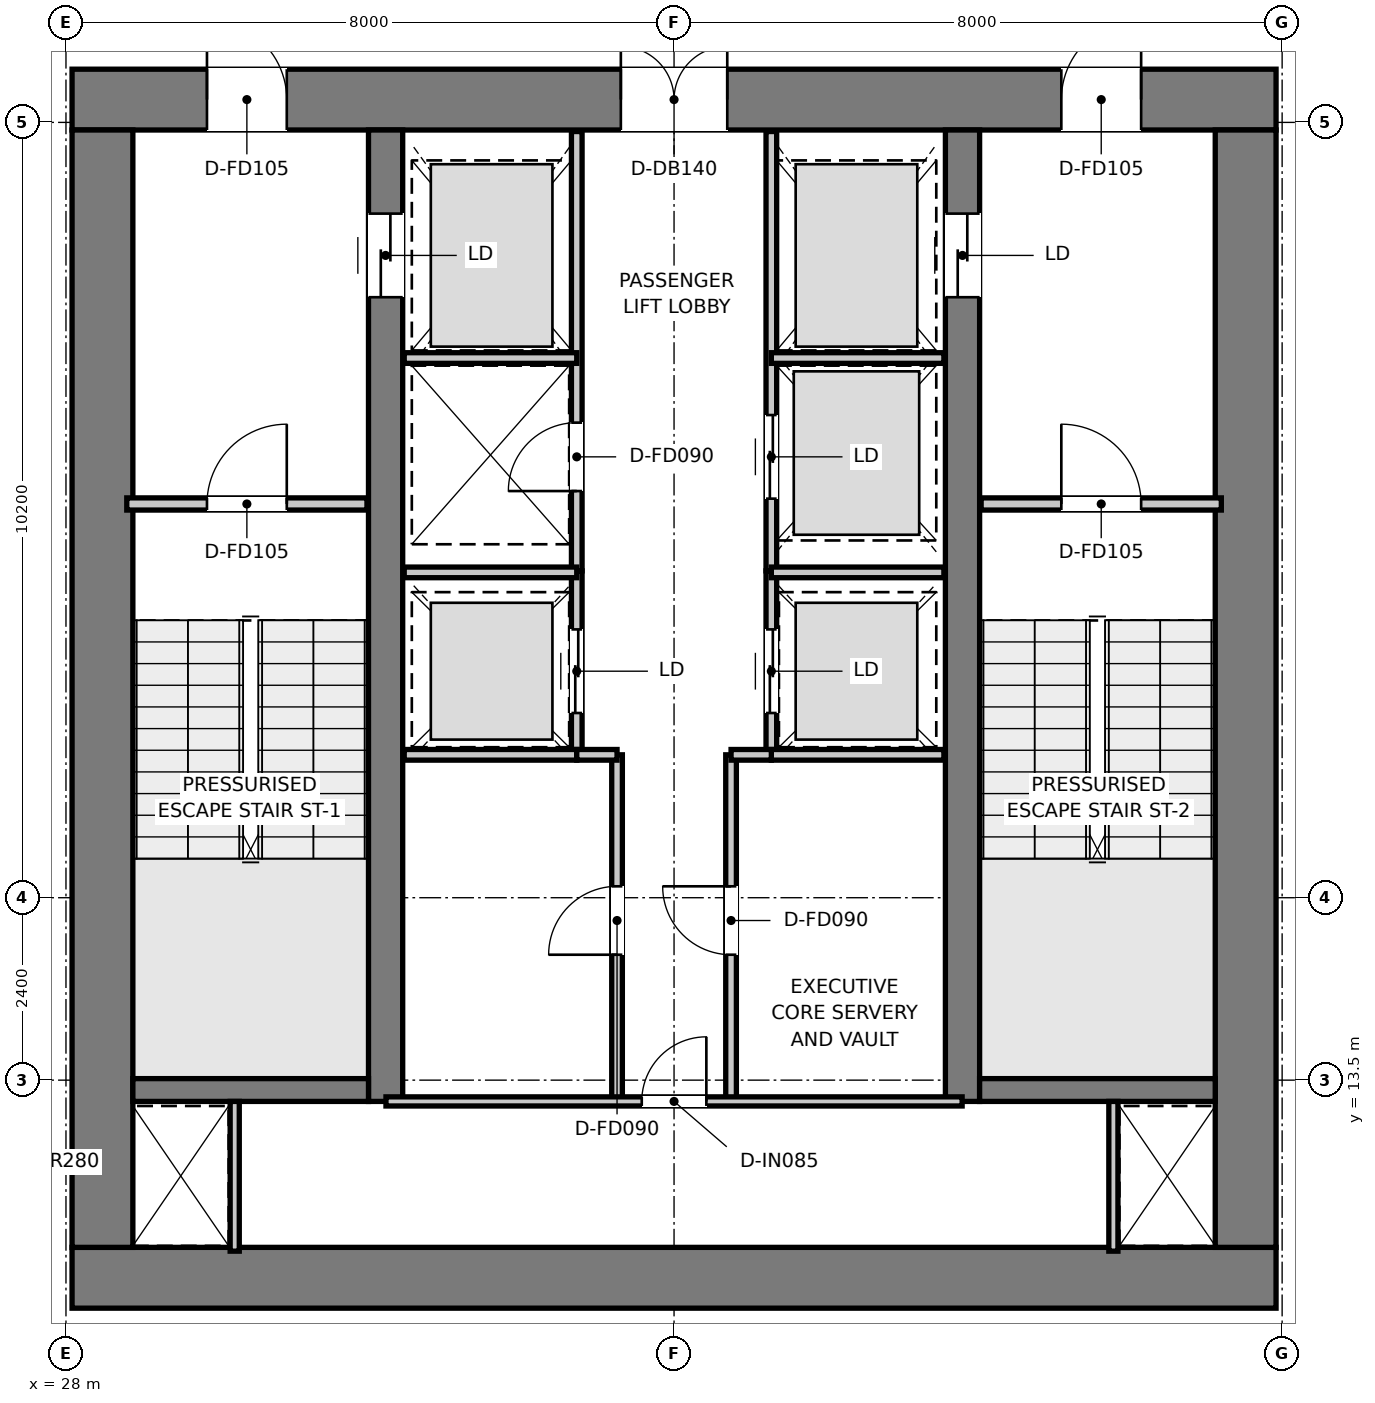
"""IFC4 building model, lengths in metres.
Left out: names, types, materials, properties, quantities, classifications, styles, units other than length and angle.
Written with IfcOpenShell. Run it as: python <this file> out.ifc"""

import sys

from ifc_helpers import new_model, si_unit, direction, frame, frame_2d, origin, place, context, subcontext, project, spatial, rectangle, extrude, element, fill, save


model = new_model("IFC4")
c1 = context("Model", 3, precision=1e-05, world=origin(), true_north=direction((0.0, 1.0)))
c2 = subcontext(c1, "Body", "Model", "MODEL_VIEW")
j1 = project(units=[si_unit("LENGTHUNIT", "METRE"), si_unit("PLANEANGLEUNIT", "RADIAN")], contexts=[c1])
p1 = place(None, origin())
s1 = spatial("IfcSite", under=j1, at=p1, CompositionType="ELEMENT")
p2 = place(p1, origin())
s2 = spatial("IfcBuilding", under=s1, at=p2, CompositionType="ELEMENT")
p3 = place(p2, frame((0.0, 0.0, 310.85)))
s3 = spatial("IfcBuildingStorey", under=s2, at=p3, CompositionType="ELEMENT", Elevation=310.85)
p4 = place(p3, frame((28.08, 10.9, 0.0), z_axis=(0.0, 0.0, 1.0), x_axis=(1.0, 0.0, 0.0)))
e1 = element("IfcWall", 1, at=p4, inside=s3, PredefinedType="SHEAR", context=c2, shape_type="SweptSolid", body=[
    extrude(rectangle(XDim=15.84, YDim=0.8, at=frame_2d((7.92, 0.0))), origin(), (0.0, 0.0, 1.0), 3.95),
])
p5 = place(p3, frame((28.08, 26.4, 0.0), z_axis=(0.0, 0.0, 1.0), x_axis=(1.0, 0.0, 0.0)))
e2 = element("IfcWall", 2, at=p5, inside=s3, PredefinedType="SHEAR", context=c2, shape_type="SweptSolid", body=[
    extrude(rectangle(XDim=15.84, YDim=0.8, at=frame_2d((7.92, 0.0))), origin(), (0.0, 0.0, 1.0), 3.95),
])
p6 = place(p5, frame((7.22, 0.0, 0.0)))
e3 = element("IfcOpeningElement", 3, at=p6, cuts=e2, PredefinedType="OPENING", context=c2, shape_type="SweptSolid", body=[
    extrude(rectangle(XDim=1.4, YDim=2.2, at=frame_2d((0.7, 1.1))), frame((0.0, 0.41, 0.0), z_axis=(0.0, -1.0, 0.0), x_axis=(1.0, 0.0, 0.0)), (0.0, 0.0, 1.0), 0.82),
])
p7 = place(p5, frame((1.775, 0.0, 0.0)))
e4 = element("IfcOpeningElement", 4, at=p7, cuts=e2, PredefinedType="OPENING", context=c2, shape_type="SweptSolid", body=[
    extrude(rectangle(XDim=1.05, YDim=2.1, at=frame_2d((0.525, 1.05))), frame((0.0, 0.41, 0.0), z_axis=(0.0, -1.0, 0.0), x_axis=(1.0, 0.0, 0.0)), (0.0, 0.0, 1.0), 0.82),
])
p8 = place(p5, frame((13.015, 0.0, 0.0)))
e5 = element("IfcOpeningElement", 5, at=p8, cuts=e2, PredefinedType="OPENING", context=c2, shape_type="SweptSolid", body=[
    extrude(rectangle(XDim=1.05, YDim=2.1, at=frame_2d((0.525, 1.05))), frame((0.0, 0.41, 0.0), z_axis=(0.0, -1.0, 0.0), x_axis=(1.0, 0.0, 0.0)), (0.0, 0.0, 1.0), 0.82),
])
for number, where, z_axis, x_axis in (
    (6, (28.48, 11.3, 0.0), (0.0, 0.0, 1.0), (0.0, 1.0, 0.0)),
    (7, (43.52, 11.3, 0.0), (0.0, 0.0, 1.0), (0.0, 1.0, 0.0)),
):
    element("IfcWall", number, at=place(p3, frame(where, z_axis=z_axis, x_axis=x_axis)), inside=s3, PredefinedType="SHEAR", context=c2, shape_type="SweptSolid", body=[
        extrude(rectangle(XDim=14.7, YDim=0.8, at=frame_2d((7.35, 0.0))), origin(), (0.0, 0.0, 1.0), 3.95),
    ])
p9 = place(p3, frame((32.205, 13.22, 0.0), z_axis=(0.0, 0.0, 1.0), x_axis=(0.0, 1.0, 0.0)))
e8 = element("IfcWall", 8, at=p9, inside=s3, PredefinedType="SHEAR", context=c2, shape_type="SweptSolid", body=[
    extrude(rectangle(XDim=12.78, YDim=0.45, at=frame_2d((6.39, 0.0))), origin(), (0.0, 0.0, 1.0), 3.95),
])
p10 = place(p9, frame((10.58, 0.0, 0.0)))
e9 = element("IfcOpeningElement", 9, at=p10, cuts=e8, PredefinedType="OPENING", context=c2, shape_type="SweptSolid", body=[
    extrude(rectangle(XDim=1.1, YDim=2.15, at=frame_2d((0.55, 1.075))), frame((0.0, 0.235, 0.0), z_axis=(0.0, -1.0, 0.0), x_axis=(1.0, 0.0, 0.0)), (0.0, 0.0, 1.0), 0.47),
])
p11 = place(p3, frame((39.795, 13.22, 0.0), z_axis=(0.0, 0.0, 1.0), x_axis=(0.0, 1.0, 0.0)))
e10 = element("IfcWall", 10, at=p11, inside=s3, PredefinedType="SHEAR", context=c2, shape_type="SweptSolid", body=[
    extrude(rectangle(XDim=12.78, YDim=0.45, at=frame_2d((6.39, 0.0))), origin(), (0.0, 0.0, 1.0), 3.95),
])
p12 = place(p11, frame((10.58, 0.0, 0.0)))
e11 = element("IfcOpeningElement", 11, at=p12, cuts=e10, PredefinedType="OPENING", context=c2, shape_type="SweptSolid", body=[
    extrude(rectangle(XDim=1.1, YDim=2.15, at=frame_2d((0.55, 1.075))), frame((0.0, 0.235, 0.0), z_axis=(0.0, -1.0, 0.0), x_axis=(1.0, 0.0, 0.0)), (0.0, 0.0, 1.0), 0.47),
])
for number, where, z_axis, x_axis in (
    (12, (28.88, 13.37, 0.0), (0.0, 0.0, 1.0), (1.0, 0.0, 0.0)),
    (13, (40.02, 13.37, 0.0), (0.0, 0.0, 1.0), (1.0, 0.0, 0.0)),
):
    element("IfcWall", number, at=place(p3, frame(where, z_axis=z_axis, x_axis=x_axis)), inside=s3, PredefinedType="SHEAR", context=c2, shape_type="SweptSolid", body=[
        extrude(rectangle(XDim=3.1, YDim=0.3, at=frame_2d((1.55, 0.0))), origin(), (0.0, 0.0, 1.0), 3.95),
    ])
p13 = place(p3, frame((28.8, 21.08, 0.0), z_axis=(0.0, 0.0, 1.0), x_axis=(1.0, 0.0, 0.0)))
e14 = element("IfcWall", 14, at=p13, inside=s3, PredefinedType="PARTITIONING", context=c2, shape_type="SweptSolid", body=[
    extrude(rectangle(XDim=3.16, YDim=0.16, at=frame_2d((1.58, 0.0))), origin(), (0.0, 0.0, 1.0), 3.67),
])
p14 = place(p13, frame((1.055, 0.0, 0.0)))
e15 = element("IfcOpeningElement", 15, at=p14, cuts=e14, PredefinedType="OPENING", context=c2, shape_type="SweptSolid", body=[
    extrude(rectangle(XDim=1.05, YDim=2.1, at=frame_2d((0.525, 1.05))), frame((0.0, 0.09, 0.0), z_axis=(0.0, -1.0, 0.0), x_axis=(1.0, 0.0, 0.0)), (0.0, 0.0, 1.0), 0.18),
])
p15 = place(p3, frame((40.04, 21.08, 0.0), z_axis=(0.0, 0.0, 1.0), x_axis=(1.0, 0.0, 0.0)))
e16 = element("IfcWall", 16, at=p15, inside=s3, PredefinedType="PARTITIONING", context=c2, shape_type="SweptSolid", body=[
    extrude(rectangle(XDim=3.16, YDim=0.16, at=frame_2d((1.58, 0.0))), origin(), (0.0, 0.0, 1.0), 3.67),
])
p16 = place(p15, frame((1.055, 0.0, 0.0)))
e17 = element("IfcOpeningElement", 17, at=p16, cuts=e16, PredefinedType="OPENING", context=c2, shape_type="SweptSolid", body=[
    extrude(rectangle(XDim=1.05, YDim=2.1, at=frame_2d((0.525, 1.05))), frame((0.0, 0.09, 0.0), z_axis=(0.0, -1.0, 0.0), x_axis=(1.0, 0.0, 0.0)), (0.0, 0.0, 1.0), 0.18),
])
p17 = place(p3, frame((34.72, 20.2, 0.0), z_axis=(0.0, 0.0, 1.0), x_axis=(0.0, 1.0, 0.0)))
e18 = element("IfcWall", 18, at=p17, inside=s3, PredefinedType="PARTITIONING", context=c2, shape_type="SweptSolid", body=[
    extrude(rectangle(XDim=5.78, YDim=0.14, at=frame_2d((2.89, 0.0))), origin(), (0.0, 0.0, 1.0), 2.82),
])
p18 = place(p17, frame((1.05, 0.0, 0.0)))
e19 = element("IfcOpeningElement", 19, at=p18, cuts=e18, PredefinedType="OPENING", context=c2, shape_type="SweptSolid", body=[
    extrude(rectangle(XDim=0.9, YDim=2.1, at=frame_2d((0.45, 1.05))), frame((0.0, 0.08, 0.0), z_axis=(0.0, -1.0, 0.0), x_axis=(1.0, 0.0, 0.0)), (0.0, 0.0, 1.0), 0.16),
])
p19 = place(p3, frame((37.28, 20.2, 0.0), z_axis=(0.0, 0.0, 1.0), x_axis=(0.0, 1.0, 0.0)))
e20 = element("IfcWall", 20, at=p19, inside=s3, PredefinedType="PARTITIONING", context=c2, shape_type="SweptSolid", body=[
    extrude(rectangle(XDim=5.78, YDim=0.14, at=frame_2d((2.89, 0.0))), origin(), (0.0, 0.0, 1.0), 2.82),
])
p20 = place(p19, frame((0.95, 0.0, 0.0)))
e21 = element("IfcOpeningElement", 21, at=p20, cuts=e20, PredefinedType="OPENING", context=c2, shape_type="SweptSolid", body=[
    extrude(rectangle(XDim=1.1, YDim=2.15, at=frame_2d((0.55, 1.075))), frame((0.0, 0.08, 0.0), z_axis=(0.0, -1.0, 0.0), x_axis=(1.0, 0.0, 0.0)), (0.0, 0.0, 1.0), 0.16),
])
for number, where, z_axis, x_axis in (
    (22, (32.45, 23.0, 0.0), (0.0, 0.0, 1.0), (1.0, 0.0, 0.0)),
    (23, (37.28, 23.0, 0.0), (0.0, 0.0, 1.0), (1.0, 0.0, 0.0)),
):
    element("IfcWall", number, at=place(p3, frame(where, z_axis=z_axis, x_axis=x_axis)), inside=s3, PredefinedType="PARTITIONING", context=c2, shape_type="SweptSolid", body=[
        extrude(rectangle(XDim=2.27, YDim=0.14, at=frame_2d((1.135, 0.0))), origin(), (0.0, 0.0, 1.0), 2.82),
    ])
p21 = place(p3, frame((34.72, 17.78, 0.0), z_axis=(0.0, 0.0, 1.0), x_axis=(0.0, 1.0, 0.0)))
e24 = element("IfcWall", 24, at=p21, inside=s3, PredefinedType="PARTITIONING", context=c2, shape_type="SweptSolid", body=[
    extrude(rectangle(XDim=2.42, YDim=0.14, at=frame_2d((1.21, 0.0))), origin(), (0.0, 0.0, 1.0), 3.67),
])
p22 = place(p21, frame((0.55, 0.0, 0.0)))
e25 = element("IfcOpeningElement", 25, at=p22, cuts=e24, PredefinedType="OPENING", context=c2, shape_type="SweptSolid", body=[
    extrude(rectangle(XDim=1.1, YDim=2.15, at=frame_2d((0.55, 1.075))), frame((0.0, 0.08, 0.0), z_axis=(0.0, -1.0, 0.0), x_axis=(1.0, 0.0, 0.0)), (0.0, 0.0, 1.0), 0.16),
])
p23 = place(p3, frame((37.28, 17.78, 0.0), z_axis=(0.0, 0.0, 1.0), x_axis=(0.0, 1.0, 0.0)))
e26 = element("IfcWall", 26, at=p23, inside=s3, PredefinedType="PARTITIONING", context=c2, shape_type="SweptSolid", body=[
    extrude(rectangle(XDim=2.42, YDim=0.14, at=frame_2d((1.21, 0.0))), origin(), (0.0, 0.0, 1.0), 3.67),
])
p24 = place(p23, frame((0.55, 0.0, 0.0)))
e27 = element("IfcOpeningElement", 27, at=p24, cuts=e26, PredefinedType="OPENING", context=c2, shape_type="SweptSolid", body=[
    extrude(rectangle(XDim=1.1, YDim=2.15, at=frame_2d((0.55, 1.075))), frame((0.0, 0.08, 0.0), z_axis=(0.0, -1.0, 0.0), x_axis=(1.0, 0.0, 0.0)), (0.0, 0.0, 1.0), 0.16),
])
for number, where, z_axis, x_axis in (
    (28, (32.45, 17.78, 0.0), (0.0, 0.0, 1.0), (1.0, 0.0, 0.0)),
    (29, (32.45, 20.18, 0.0), (0.0, 0.0, 1.0), (1.0, 0.0, 0.0)),
    (30, (37.28, 17.78, 0.0), (0.0, 0.0, 1.0), (1.0, 0.0, 0.0)),
    (31, (37.28, 20.18, 0.0), (0.0, 0.0, 1.0), (1.0, 0.0, 0.0)),
):
    element("IfcWall", number, at=place(p3, frame(where, z_axis=z_axis, x_axis=x_axis)), inside=s3, PredefinedType="PARTITIONING", context=c2, shape_type="SweptSolid", body=[
        extrude(rectangle(XDim=2.27, YDim=0.14, at=frame_2d((1.135, 0.0))), origin(), (0.0, 0.0, 1.0), 3.67),
    ])
p25 = place(p3, frame((35.25, 13.22, 0.0), z_axis=(0.0, 0.0, 1.0), x_axis=(0.0, 1.0, 0.0)))
e32 = element("IfcWall", 32, at=p25, inside=s3, PredefinedType="PARTITIONING", context=c2, shape_type="SweptSolid", body=[
    extrude(rectangle(XDim=4.56, YDim=0.14, at=frame_2d((2.28, 0.0))), origin(), (0.0, 0.0, 1.0), 3.67),
])
p26 = place(p25, frame((1.93, 0.0, 0.0)))
e33 = element("IfcOpeningElement", 33, at=p26, cuts=e32, PredefinedType="OPENING", context=c2, shape_type="SweptSolid", body=[
    extrude(rectangle(XDim=0.9, YDim=2.1, at=frame_2d((0.45, 1.05))), frame((0.0, 0.08, 0.0), z_axis=(0.0, -1.0, 0.0), x_axis=(1.0, 0.0, 0.0)), (0.0, 0.0, 1.0), 0.16),
])
p27 = place(p3, frame((34.72, 17.78, 0.0), z_axis=(0.0, 0.0, 1.0), x_axis=(1.0, 0.0, 0.0)))
e34 = element("IfcWall", 34, at=p27, inside=s3, PredefinedType="PARTITIONING", context=c2, shape_type="SweptSolid", body=[
    extrude(rectangle(XDim=0.53, YDim=0.14, at=frame_2d((0.265, 0.0))), origin(), (0.0, 0.0, 1.0), 3.67),
])
p28 = place(p3, frame((36.75, 13.22, 0.0), z_axis=(0.0, 0.0, 1.0), x_axis=(0.0, 1.0, 0.0)))
e35 = element("IfcWall", 35, at=p28, inside=s3, PredefinedType="PARTITIONING", context=c2, shape_type="SweptSolid", body=[
    extrude(rectangle(XDim=4.56, YDim=0.14, at=frame_2d((2.28, 0.0))), origin(), (0.0, 0.0, 1.0), 3.67),
])
p29 = place(p28, frame((1.93, 0.0, 0.0)))
e36 = element("IfcOpeningElement", 36, at=p29, cuts=e35, PredefinedType="OPENING", context=c2, shape_type="SweptSolid", body=[
    extrude(rectangle(XDim=0.9, YDim=2.1, at=frame_2d((0.45, 1.05))), frame((0.0, 0.08, 0.0), z_axis=(0.0, -1.0, 0.0), x_axis=(1.0, 0.0, 0.0)), (0.0, 0.0, 1.0), 0.16),
])
p30 = place(p3, frame((36.75, 17.78, 0.0), z_axis=(0.0, 0.0, 1.0), x_axis=(1.0, 0.0, 0.0)))
e37 = element("IfcWall", 37, at=p30, inside=s3, PredefinedType="PARTITIONING", context=c2, shape_type="SweptSolid", body=[
    extrude(rectangle(XDim=0.53, YDim=0.14, at=frame_2d((0.265, 0.0))), origin(), (0.0, 0.0, 1.0), 3.67),
])
for number, where, z_axis, x_axis in (
    (38, (30.22, 11.25, 0.0), (0.0, 0.0, 1.0), (0.0, 1.0, 0.0)),
    (39, (41.78, 11.25, 0.0), (0.0, 0.0, 1.0), (0.0, 1.0, 0.0)),
):
    element("IfcWall", number, at=place(p3, frame(where, z_axis=z_axis, x_axis=x_axis)), inside=s3, PredefinedType="PARTITIONING", context=c2, shape_type="SweptSolid", body=[
        extrude(rectangle(XDim=1.97, YDim=0.12, at=frame_2d((0.985, 0.0))), origin(), (0.0, 0.0, 1.0), 3.67),
    ])
p31 = place(p3, frame((32.21, 13.22, 0.0), z_axis=(0.0, 0.0, 1.0), x_axis=(1.0, 0.0, 0.0)))
e40 = element("IfcWall", 40, at=p31, inside=s3, PredefinedType="PARTITIONING", context=c2, shape_type="SweptSolid", body=[
    extrude(rectangle(XDim=7.58, YDim=0.12, at=frame_2d((3.79, 0.0))), origin(), (0.0, 0.0, 1.0), 3.67),
])
p32 = place(p31, frame((3.365, 0.0, 0.0)))
e41 = element("IfcOpeningElement", 41, at=p32, cuts=e40, PredefinedType="OPENING", context=c2, shape_type="SweptSolid", body=[
    extrude(rectangle(XDim=0.85, YDim=2.1, at=frame_2d((0.425, 1.05))), frame((0.0, 0.07, 0.0), z_axis=(0.0, -1.0, 0.0), x_axis=(1.0, 0.0, 0.0)), (0.0, 0.0, 1.0), 0.14),
])
p33 = place(p14, origin())
e42 = element("IfcDoor", 42, at=p33, inside=s3, OperationType="SINGLE_SWING_RIGHT", PredefinedType="DOOR", context=c2, shape_type="SweptSolid", body=[
    extrude(rectangle(XDim=1.05, YDim=2.1, at=frame_2d((0.525, 1.05))), frame((0.0, 0.025, 0.0), z_axis=(0.0, -1.0, 0.0), x_axis=(1.0, 0.0, 0.0)), (0.0, 0.0, 1.0), 0.05),
])
fill(e15, e42)
p34 = place(p16, origin())
e43 = element("IfcDoor", 43, at=p34, inside=s3, OperationType="SINGLE_SWING_LEFT", PredefinedType="DOOR", context=c2, shape_type="SweptSolid", body=[
    extrude(rectangle(XDim=1.05, YDim=2.1, at=frame_2d((0.525, 1.05))), frame((0.0, 0.025, 0.0), z_axis=(0.0, -1.0, 0.0), x_axis=(1.0, 0.0, 0.0)), (0.0, 0.0, 1.0), 0.05),
])
fill(e17, e43)
p35 = place(p6, origin())
e44 = element("IfcDoor", 44, at=p35, inside=s3, OperationType="DOUBLE_DOOR_SINGLE_SWING", PredefinedType="DOOR", context=c2, shape_type="SweptSolid", body=[
    extrude(rectangle(XDim=1.4, YDim=2.2, at=frame_2d((0.7, 1.1))), frame((0.0, 0.025, 0.0), z_axis=(0.0, -1.0, 0.0), x_axis=(1.0, 0.0, 0.0)), (0.0, 0.0, 1.0), 0.05),
])
fill(e3, e44)
p36 = place(p7, origin())
e45 = element("IfcDoor", 45, at=p36, inside=s3, OperationType="SINGLE_SWING_LEFT", PredefinedType="DOOR", context=c2, shape_type="SweptSolid", body=[
    extrude(rectangle(XDim=1.05, YDim=2.1, at=frame_2d((0.525, 1.05))), frame((0.0, 0.025, 0.0), z_axis=(0.0, -1.0, 0.0), x_axis=(1.0, 0.0, 0.0)), (0.0, 0.0, 1.0), 0.05),
])
fill(e4, e45)
p37 = place(p8, origin())
e46 = element("IfcDoor", 46, at=p37, inside=s3, OperationType="SINGLE_SWING_RIGHT", PredefinedType="DOOR", context=c2, shape_type="SweptSolid", body=[
    extrude(rectangle(XDim=1.05, YDim=2.1, at=frame_2d((0.525, 1.05))), frame((0.0, 0.025, 0.0), z_axis=(0.0, -1.0, 0.0), x_axis=(1.0, 0.0, 0.0)), (0.0, 0.0, 1.0), 0.05),
])
fill(e5, e46)
p38 = place(p10, origin())
e47 = element("IfcDoor", 47, at=p38, inside=s3, OperationType="DOUBLE_DOOR_SLIDING", PredefinedType="DOOR", context=c2, shape_type="SweptSolid", body=[
    extrude(rectangle(XDim=1.1, YDim=2.15, at=frame_2d((0.55, 1.075))), frame((0.0, 0.025, 0.0), z_axis=(0.0, -1.0, 0.0), x_axis=(1.0, 0.0, 0.0)), (0.0, 0.0, 1.0), 0.05),
])
fill(e9, e47)
p39 = place(p12, origin())
e48 = element("IfcDoor", 48, at=p39, inside=s3, OperationType="DOUBLE_DOOR_SLIDING", PredefinedType="DOOR", context=c2, shape_type="SweptSolid", body=[
    extrude(rectangle(XDim=1.1, YDim=2.15, at=frame_2d((0.55, 1.075))), frame((0.0, 0.025, 0.0), z_axis=(0.0, -1.0, 0.0), x_axis=(1.0, 0.0, 0.0)), (0.0, 0.0, 1.0), 0.05),
])
fill(e11, e48)
p40 = place(p18, origin())
e49 = element("IfcDoor", 49, at=p40, inside=s3, OperationType="SINGLE_SWING_LEFT", PredefinedType="DOOR", context=c2, shape_type="SweptSolid", body=[
    extrude(rectangle(XDim=0.9, YDim=2.1, at=frame_2d((0.45, 1.05))), frame((0.0, 0.025, 0.0), z_axis=(0.0, -1.0, 0.0), x_axis=(1.0, 0.0, 0.0)), (0.0, 0.0, 1.0), 0.05),
])
fill(e19, e49)
p41 = place(p20, origin())
e50 = element("IfcDoor", 50, at=p41, inside=s3, OperationType="DOUBLE_DOOR_SLIDING", PredefinedType="DOOR", context=c2, shape_type="SweptSolid", body=[
    extrude(rectangle(XDim=1.1, YDim=2.15, at=frame_2d((0.55, 1.075))), frame((0.0, 0.025, 0.0), z_axis=(0.0, -1.0, 0.0), x_axis=(1.0, 0.0, 0.0)), (0.0, 0.0, 1.0), 0.05),
])
fill(e21, e50)
p42 = place(p22, origin())
e51 = element("IfcDoor", 51, at=p42, inside=s3, OperationType="DOUBLE_DOOR_SLIDING", PredefinedType="DOOR", context=c2, shape_type="SweptSolid", body=[
    extrude(rectangle(XDim=1.1, YDim=2.15, at=frame_2d((0.55, 1.075))), frame((0.0, 0.025, 0.0), z_axis=(0.0, -1.0, 0.0), x_axis=(1.0, 0.0, 0.0)), (0.0, 0.0, 1.0), 0.05),
])
fill(e25, e51)
p43 = place(p24, origin())
e52 = element("IfcDoor", 52, at=p43, inside=s3, OperationType="DOUBLE_DOOR_SLIDING", PredefinedType="DOOR", context=c2, shape_type="SweptSolid", body=[
    extrude(rectangle(XDim=1.1, YDim=2.15, at=frame_2d((0.55, 1.075))), frame((0.0, 0.025, 0.0), z_axis=(0.0, -1.0, 0.0), x_axis=(1.0, 0.0, 0.0)), (0.0, 0.0, 1.0), 0.05),
])
fill(e27, e52)
p44 = place(p26, origin())
e53 = element("IfcDoor", 53, at=p44, inside=s3, OperationType="SINGLE_SWING_LEFT", PredefinedType="DOOR", context=c2, shape_type="SweptSolid", body=[
    extrude(rectangle(XDim=0.9, YDim=2.1, at=frame_2d((0.45, 1.05))), frame((0.0, 0.025, 0.0), z_axis=(0.0, -1.0, 0.0), x_axis=(1.0, 0.0, 0.0)), (0.0, 0.0, 1.0), 0.05),
])
fill(e33, e53)
p45 = place(p29, origin())
e54 = element("IfcDoor", 54, at=p45, inside=s3, OperationType="SINGLE_SWING_RIGHT", PredefinedType="DOOR", context=c2, shape_type="SweptSolid", body=[
    extrude(rectangle(XDim=0.9, YDim=2.1, at=frame_2d((0.45, 1.05))), frame((0.0, 0.025, 0.0), z_axis=(0.0, -1.0, 0.0), x_axis=(1.0, 0.0, 0.0)), (0.0, 0.0, 1.0), 0.05),
])
fill(e36, e54)
p46 = place(p32, origin())
e55 = element("IfcDoor", 55, at=p46, inside=s3, OperationType="SINGLE_SWING_RIGHT", PredefinedType="DOOR", context=c2, shape_type="SweptSolid", body=[
    extrude(rectangle(XDim=0.85, YDim=2.1, at=frame_2d((0.425, 1.05))), frame((0.0, 0.025, 0.0), z_axis=(0.0, -1.0, 0.0), x_axis=(1.0, 0.0, 0.0)), (0.0, 0.0, 1.0), 0.05),
])
fill(e41, e55)
save(model, sys.argv[1])
